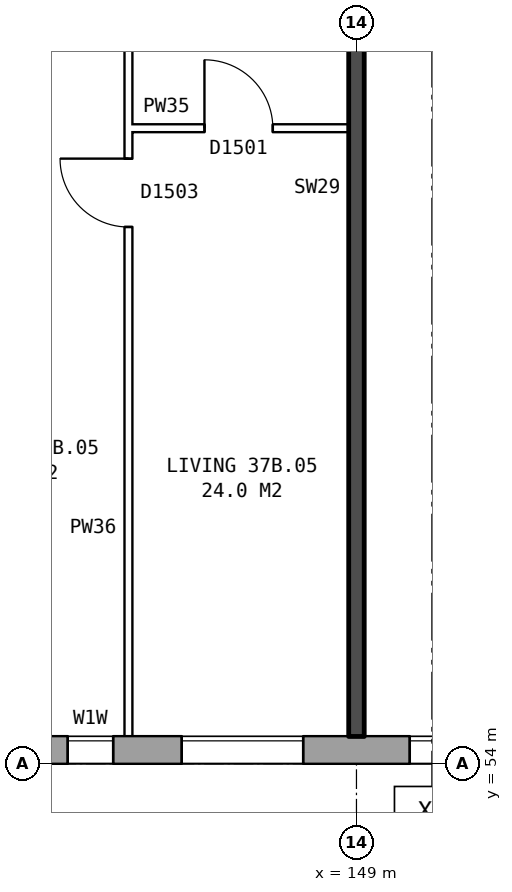
"""IFC4 building model, lengths in metres.
Left out: names, types, materials, properties, quantities, classifications, styles, units other than length and angle.
Written with IfcOpenShell. Run it as: python <this file> out.ifc"""

import sys

from ifc_helpers import new_model, si_unit, direction, frame, frame_2d, origin, place, context, subcontext, project, spatial, rectangle, extrude, element, fill, save


model = new_model("IFC4")
c1 = context("Model", 3, precision=1e-05, world=origin(), true_north=direction((0.0, 1.0)))
c2 = subcontext(c1, "Body", "Model", "MODEL_VIEW")
j1 = project(units=[si_unit("LENGTHUNIT", "METRE"), si_unit("PLANEANGLEUNIT", "RADIAN")], contexts=[c1])
p1 = place(None, origin())
s1 = spatial("IfcSite", under=j1, at=p1, CompositionType="ELEMENT")
p2 = place(p1, origin())
s2 = spatial("IfcBuilding", under=s1, at=p2, CompositionType="ELEMENT")
p3 = place(p2, frame((0.0, 0.0, 133.0)))
s3 = spatial("IfcBuildingStorey", under=s2, at=p3, CompositionType="ELEMENT", Elevation=133.0)
p4 = place(p3, frame((134.075, 54.18, 0.0), z_axis=(0.0, 0.0, 1.0), x_axis=(1.0, 0.0, 0.0)))
e1 = element("IfcWall", 1, at=p4, inside=s3, PredefinedType="STANDARD", context=c2, shape_type="SweptSolid", body=[
    extrude(rectangle(XDim=35.601, YDim=0.36, at=frame_2d((17.8, 0.0))), origin(), (0.0, 0.0, 1.0), 2.85),
])
p5 = place(p4, frame((0.625, 0.0, 0.8)))
e2 = element("IfcOpeningElement", 2, at=p5, cuts=e1, PredefinedType="OPENING", context=c2, shape_type="SweptSolid", body=[
    extrude(rectangle(XDim=1.6, YDim=1.8, at=frame_2d((0.8, 0.9))), frame((0.0, 0.19, 0.0), z_axis=(0.0, -1.0, 0.0), x_axis=(1.0, 0.0, 0.0)), (0.0, 0.0, 1.0), 0.38),
])
p6 = place(p4, frame((3.625, 0.0, 0.8)))
e3 = element("IfcOpeningElement", 3, at=p6, cuts=e1, PredefinedType="OPENING", context=c2, shape_type="SweptSolid", body=[
    extrude(rectangle(XDim=1.6, YDim=1.8, at=frame_2d((0.8, 0.9))), frame((0.0, 0.19, 0.0), z_axis=(0.0, -1.0, 0.0), x_axis=(1.0, 0.0, 0.0)), (0.0, 0.0, 1.0), 0.38),
])
p7 = place(p4, frame((6.625, 0.0, 0.8)))
e4 = element("IfcOpeningElement", 4, at=p7, cuts=e1, PredefinedType="OPENING", context=c2, shape_type="SweptSolid", body=[
    extrude(rectangle(XDim=1.6, YDim=1.8, at=frame_2d((0.8, 0.9))), frame((0.0, 0.19, 0.0), z_axis=(0.0, -1.0, 0.0), x_axis=(1.0, 0.0, 0.0)), (0.0, 0.0, 1.0), 0.38),
])
p8 = place(p4, frame((9.125, 0.0, 1.35)))
e5 = element("IfcOpeningElement", 5, at=p8, cuts=e1, PredefinedType="OPENING", context=c2, shape_type="SweptSolid", body=[
    extrude(rectangle(XDim=1.2, YDim=1.2, at=frame_2d((0.6, 0.6))), frame((0.0, 0.19, 0.0), z_axis=(0.0, -1.0, 0.0), x_axis=(1.0, 0.0, 0.0)), (0.0, 0.0, 1.0), 0.38),
])
p9 = place(p4, frame((12.625, 0.0, 0.8)))
e6 = element("IfcOpeningElement", 6, at=p9, cuts=e1, PredefinedType="OPENING", context=c2, shape_type="SweptSolid", body=[
    extrude(rectangle(XDim=1.6, YDim=1.8, at=frame_2d((0.8, 0.9))), frame((0.0, 0.19, 0.0), z_axis=(0.0, -1.0, 0.0), x_axis=(1.0, 0.0, 0.0)), (0.0, 0.0, 1.0), 0.38),
])
p10 = place(p4, frame((15.625, 0.0, 0.8)))
e7 = element("IfcOpeningElement", 7, at=p10, cuts=e1, PredefinedType="OPENING", context=c2, shape_type="SweptSolid", body=[
    extrude(rectangle(XDim=1.6, YDim=1.8, at=frame_2d((0.8, 0.9))), frame((0.0, 0.19, 0.0), z_axis=(0.0, -1.0, 0.0), x_axis=(1.0, 0.0, 0.0)), (0.0, 0.0, 1.0), 0.38),
])
p11 = place(p4, frame((18.625, 0.0, 0.8)))
e8 = element("IfcOpeningElement", 8, at=p11, cuts=e1, PredefinedType="OPENING", context=c2, shape_type="SweptSolid", body=[
    extrude(rectangle(XDim=1.6, YDim=1.8, at=frame_2d((0.8, 0.9))), frame((0.0, 0.19, 0.0), z_axis=(0.0, -1.0, 0.0), x_axis=(1.0, 0.0, 0.0)), (0.0, 0.0, 1.0), 0.38),
])
p12 = place(p4, frame((21.625, 0.0, 0.8)))
e9 = element("IfcOpeningElement", 9, at=p12, cuts=e1, PredefinedType="OPENING", context=c2, shape_type="SweptSolid", body=[
    extrude(rectangle(XDim=1.6, YDim=1.8, at=frame_2d((0.8, 0.9))), frame((0.0, 0.19, 0.0), z_axis=(0.0, -1.0, 0.0), x_axis=(1.0, 0.0, 0.0)), (0.0, 0.0, 1.0), 0.38),
])
p13 = place(p4, frame((24.975, 0.0, 1.7)))
e10 = element("IfcOpeningElement", 10, at=p13, cuts=e1, PredefinedType="OPENING", context=c2, shape_type="SweptSolid", body=[
    extrude(rectangle(XDim=0.6, YDim=0.9, at=frame_2d((0.3, 0.45))), frame((0.0, 0.19, 0.0), z_axis=(0.0, -1.0, 0.0), x_axis=(1.0, 0.0, 0.0)), (0.0, 0.0, 1.0), 0.38),
])
p14 = place(p4, frame((27.625, 0.0, 0.8)))
e11 = element("IfcOpeningElement", 11, at=p14, cuts=e1, PredefinedType="OPENING", context=c2, shape_type="SweptSolid", body=[
    extrude(rectangle(XDim=1.6, YDim=1.8, at=frame_2d((0.8, 0.9))), frame((0.0, 0.19, 0.0), z_axis=(0.0, -1.0, 0.0), x_axis=(1.0, 0.0, 0.0)), (0.0, 0.0, 1.0), 0.38),
])
p15 = place(p4, frame((30.625, 0.0, 0.8)))
e12 = element("IfcOpeningElement", 12, at=p15, cuts=e1, PredefinedType="OPENING", context=c2, shape_type="SweptSolid", body=[
    extrude(rectangle(XDim=1.6, YDim=1.8, at=frame_2d((0.8, 0.9))), frame((0.0, 0.19, 0.0), z_axis=(0.0, -1.0, 0.0), x_axis=(1.0, 0.0, 0.0)), (0.0, 0.0, 1.0), 0.38),
])
p16 = place(p4, frame((33.625, 0.0, 0.8)))
e13 = element("IfcOpeningElement", 13, at=p16, cuts=e1, PredefinedType="OPENING", context=c2, shape_type="SweptSolid", body=[
    extrude(rectangle(XDim=1.6, YDim=1.8, at=frame_2d((0.8, 0.9))), frame((0.0, 0.19, 0.0), z_axis=(0.0, -1.0, 0.0), x_axis=(1.0, 0.0, 0.0)), (0.0, 0.0, 1.0), 0.38),
])
p17 = place(p4, frame((11.125, 0.0, 0.15)))
e14 = element("IfcOpeningElement", 14, at=p17, cuts=e1, PredefinedType="OPENING", context=c2, shape_type="SweptSolid", body=[
    extrude(rectangle(XDim=0.6, YDim=0.9, at=frame_2d((0.3, 0.45))), frame((0.0, 0.19, 0.0), z_axis=(0.0, -1.0, 0.0), x_axis=(1.0, 0.0, 0.0)), (0.0, 0.0, 1.0), 0.38),
])
p18 = place(p4, frame((25.875, 0.0, 0.8)))
e15 = element("IfcOpeningElement", 15, at=p18, cuts=e1, PredefinedType="OPENING", context=c2, shape_type="SweptSolid", body=[
    extrude(rectangle(XDim=0.8, YDim=1.8, at=frame_2d((0.4, 0.9))), frame((0.0, 0.19, 0.0), z_axis=(0.0, -1.0, 0.0), x_axis=(1.0, 0.0, 0.0)), (0.0, 0.0, 1.0), 0.38),
])
p19 = place(p3, frame((146.0, 62.36, 0.0), z_axis=(0.0, 0.0, 1.0), x_axis=(1.0, 0.0, 0.0)))
e16 = element("IfcWall", 16, at=p19, inside=s3, PredefinedType="PARTITIONING", context=c2, shape_type="SweptSolid", body=[
    extrude(rectangle(XDim=2.9, YDim=0.1, at=frame_2d((1.45, 0.0))), origin(), (0.0, 0.0, 1.0), 2.85),
])
p20 = place(p19, frame((1.0, 0.0, 0.0)))
e17 = element("IfcOpeningElement", 17, at=p20, cuts=e16, PredefinedType="OPENING", context=c2, shape_type="SweptSolid", body=[
    extrude(rectangle(XDim=0.9, YDim=2.1, at=frame_2d((0.45, 1.05))), frame((0.0, 0.06, 0.0), z_axis=(0.0, -1.0, 0.0), x_axis=(1.0, 0.0, 0.0)), (0.0, 0.0, 1.0), 0.12),
])
p21 = place(p3, frame((146.0, 54.36, 0.0), z_axis=(0.0, 0.0, 1.0), x_axis=(0.0, 1.0, 0.0)))
e18 = element("IfcWall", 18, at=p21, inside=s3, PredefinedType="PARTITIONING", context=c2, shape_type="SweptSolid", body=[
    extrude(rectangle(XDim=14.34, YDim=0.1, at=frame_2d((7.17, 0.0))), origin(), (0.0, 0.0, 1.0), 2.85),
])
p22 = place(p21, frame((6.7, 0.0, 0.0)))
e19 = element("IfcOpeningElement", 19, at=p22, cuts=e18, PredefinedType="OPENING", context=c2, shape_type="SweptSolid", body=[
    extrude(rectangle(XDim=0.9, YDim=2.1, at=frame_2d((0.45, 1.05))), frame((0.0, 0.06, 0.0), z_axis=(0.0, -1.0, 0.0), x_axis=(1.0, 0.0, 0.0)), (0.0, 0.0, 1.0), 0.12),
])
p23 = place(p21, frame((13.04, 0.0, 0.0)))
e20 = element("IfcOpeningElement", 20, at=p23, cuts=e18, PredefinedType="OPENING", context=c2, shape_type="SweptSolid", body=[
    extrude(rectangle(XDim=0.9, YDim=2.1, at=frame_2d((0.45, 1.05))), frame((0.0, 0.06, 0.0), z_axis=(0.0, -1.0, 0.0), x_axis=(1.0, 0.0, 0.0)), (0.0, 0.0, 1.0), 0.12),
])
p24 = place(p3, frame((149.0, 54.36, 0.0), z_axis=(0.0, 0.0, 1.0), x_axis=(0.0, 1.0, 0.0)))
e21 = element("IfcWall", 21, at=p24, inside=s3, PredefinedType="SOLIDWALL", context=c2, shape_type="SweptSolid", body=[
    extrude(rectangle(XDim=14.44, YDim=0.2, at=frame_2d((7.22, 0.0))), origin(), (0.0, 0.0, 1.0), 2.85),
])
p25 = place(p9, origin())
e22 = element("IfcWindow", 22, at=p25, inside=s3, PartitioningType="SINGLE_PANEL", PredefinedType="WINDOW", context=c2, shape_type="SweptSolid", body=[
    extrude(rectangle(XDim=1.6, YDim=1.8, at=frame_2d((0.8, 0.9))), frame((0.0, 0.15, 0.0), z_axis=(0.0, -1.0, 0.0), x_axis=(1.0, 0.0, 0.0)), (0.0, 0.0, 1.0), 0.06),
])
fill(e6, e22)
p26 = place(p10, origin())
e23 = element("IfcWindow", 23, at=p26, inside=s3, PartitioningType="SINGLE_PANEL", PredefinedType="WINDOW", context=c2, shape_type="SweptSolid", body=[
    extrude(rectangle(XDim=1.6, YDim=1.8, at=frame_2d((0.8, 0.9))), frame((0.0, 0.15, 0.0), z_axis=(0.0, -1.0, 0.0), x_axis=(1.0, 0.0, 0.0)), (0.0, 0.0, 1.0), 0.06),
])
fill(e7, e23)
p27 = place(p22, origin())
e24 = element("IfcDoor", 24, at=p27, inside=s3, OperationType="SINGLE_SWING_RIGHT", PredefinedType="DOOR", context=c2, shape_type="SweptSolid", body=[
    extrude(rectangle(XDim=0.9, YDim=2.1, at=frame_2d((0.45, 1.05))), frame((0.0, 0.025, 0.0), z_axis=(0.0, -1.0, 0.0), x_axis=(1.0, 0.0, 0.0)), (0.0, 0.0, 1.0), 0.05),
])
fill(e19, e24)
p28 = place(p20, origin())
e25 = element("IfcDoor", 25, at=p28, inside=s3, OperationType="SINGLE_SWING_LEFT", PredefinedType="DOOR", context=c2, shape_type="SweptSolid", body=[
    extrude(rectangle(XDim=0.9, YDim=2.1, at=frame_2d((0.45, 1.05))), frame((0.0, 0.025, 0.0), z_axis=(0.0, -1.0, 0.0), x_axis=(1.0, 0.0, 0.0)), (0.0, 0.0, 1.0), 0.05),
])
fill(e17, e25)
p29 = place(p17, origin())
e26 = element("IfcWindow", 26, at=p29, inside=s3, PartitioningType="SINGLE_PANEL", PredefinedType="WINDOW", context=c2, shape_type="SweptSolid", body=[
    extrude(rectangle(XDim=0.6, YDim=0.9, at=frame_2d((0.3, 0.45))), frame((0.0, 0.15, 0.0), z_axis=(0.0, -1.0, 0.0), x_axis=(1.0, 0.0, 0.0)), (0.0, 0.0, 1.0), 0.06),
])
fill(e14, e26)
save(model, sys.argv[1])
